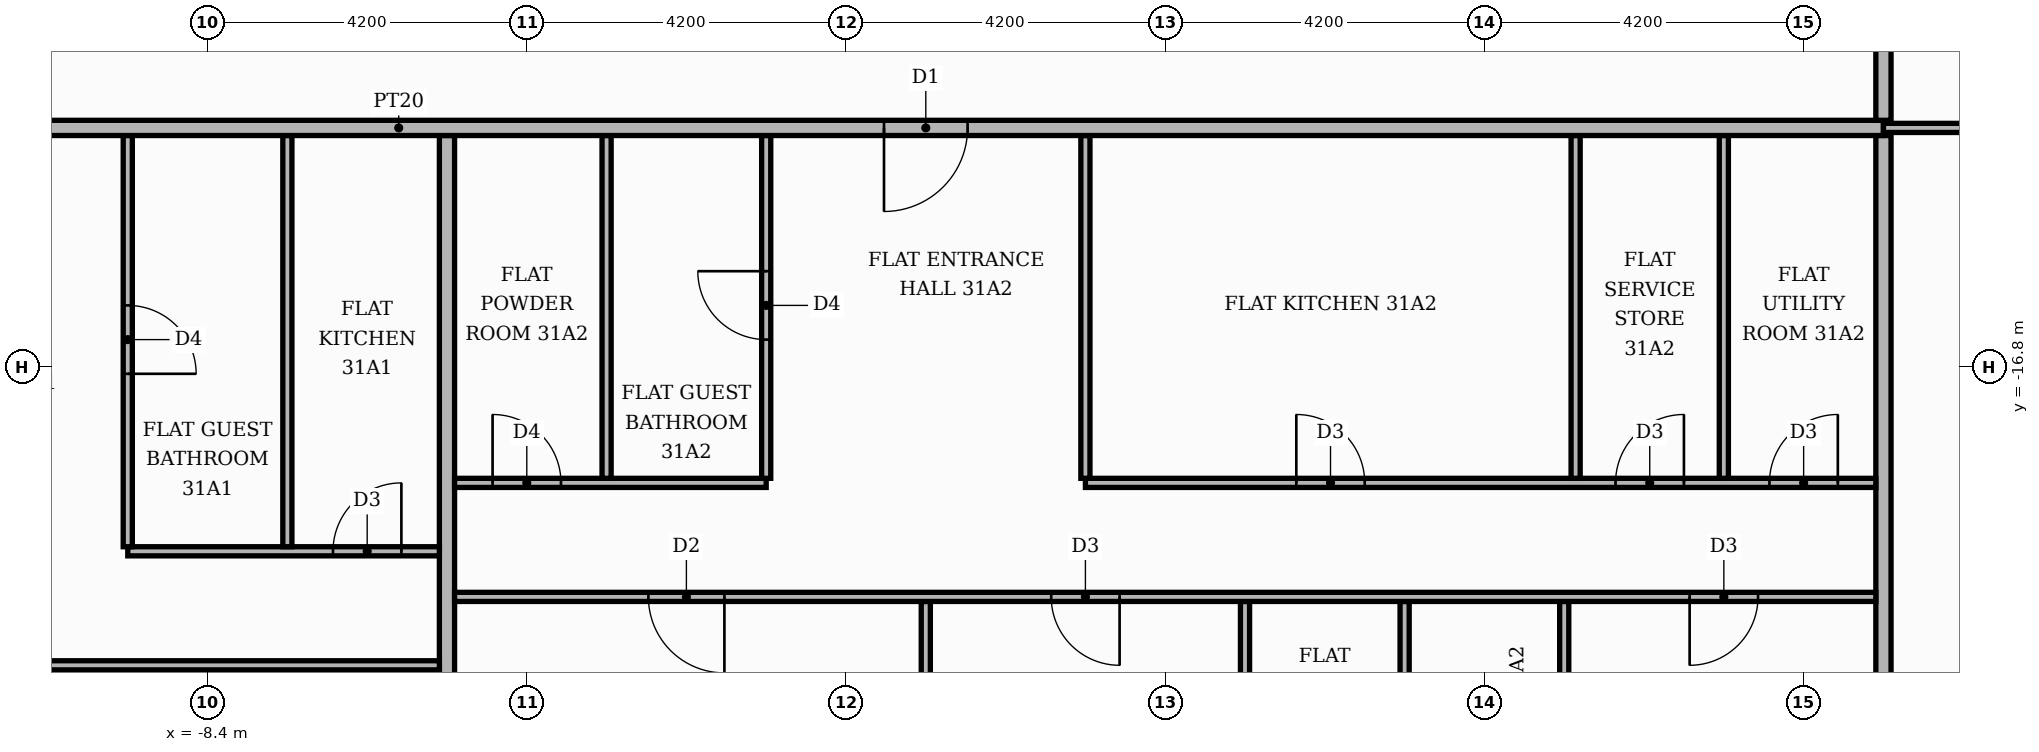
"""IFC4 building model, lengths in metres.
Left out: names, types, materials, properties, quantities, classifications, styles, units other than length and angle.
Written with IfcOpenShell. Run it as: python <this file> out.ifc"""

import sys

from ifc_helpers import new_model, si_unit, direction, frame, frame_2d, origin, place, context, subcontext, project, spatial, rectangle, extrude, element, fill, save


model = new_model("IFC4")
c1 = context("Model", 3, precision=1e-05, world=origin(), true_north=direction((0.0, 1.0)))
c2 = subcontext(c1, "Body", "Model", "MODEL_VIEW")
j1 = project(units=[si_unit("LENGTHUNIT", "METRE"), si_unit("PLANEANGLEUNIT", "RADIAN")], contexts=[c1])
p1 = place(None, origin())
s1 = spatial("IfcSite", under=j1, at=p1, CompositionType="ELEMENT")
p2 = place(p1, origin())
s2 = spatial("IfcBuilding", under=s1, at=p2, CompositionType="ELEMENT")
p3 = place(p2, frame((0.0, 0.0, 133.8)))
s3 = spatial("IfcBuildingStorey", under=s2, at=p3, CompositionType="ELEMENT", Elevation=133.8)
p4 = place(p3, frame((-9.45, -25.42, 0.0), z_axis=(0.0, 0.0, 1.0), x_axis=(0.0, 1.0, 0.0)))
e1 = element("IfcWall", 1, at=p4, inside=s3, PredefinedType="PARTITIONING", context=c2, shape_type="SweptSolid", body=[
    extrude(rectangle(XDim=4.64, YDim=0.12, at=frame_2d((2.32, 0.0))), origin(), (0.0, 0.0, 1.0), 3.48),
])
p5 = place(p4, frame((1.75, 0.0, 0.0)))
e2 = element("IfcOpeningElement", 2, at=p5, cuts=e1, PredefinedType="OPENING", context=c2, shape_type="SweptSolid", body=[
    extrude(rectangle(XDim=0.9, YDim=2.1, at=frame_2d((0.45, 1.05))), frame((0.0, 0.07, 0.0), z_axis=(0.0, -1.0, 0.0), x_axis=(1.0, 0.0, 0.0)), (0.0, 0.0, 1.0), 0.14),
])
p6 = place(p3, frame((-7.35, -25.42, 0.0), z_axis=(0.0, 0.0, 1.0), x_axis=(0.0, 1.0, 0.0)))
e3 = element("IfcWall", 3, at=p6, inside=s3, PredefinedType="PARTITIONING", context=c2, shape_type="SweptSolid", body=[
    extrude(rectangle(XDim=4.64, YDim=0.12, at=frame_2d((2.32, 0.0))), origin(), (0.0, 0.0, 1.0), 3.48),
])
p7 = place(p6, frame((1.75, 0.0, 0.0)))
e4 = element("IfcOpeningElement", 4, at=p7, cuts=e3, PredefinedType="OPENING", context=c2, shape_type="SweptSolid", body=[
    extrude(rectangle(XDim=0.9, YDim=2.1, at=frame_2d((0.45, 1.05))), frame((0.0, 0.07, 0.0), z_axis=(0.0, -1.0, 0.0), x_axis=(1.0, 0.0, 0.0)), (0.0, 0.0, 1.0), 0.14),
])
p8 = place(p3, frame((-5.25, -25.42, 0.0), z_axis=(0.0, 0.0, 1.0), x_axis=(0.0, 1.0, 0.0)))
e5 = element("IfcWall", 5, at=p8, inside=s3, PredefinedType="PARTITIONING", context=c2, shape_type="SweptSolid", body=[
    extrude(rectangle(XDim=11.67, YDim=0.2, at=frame_2d((5.835, 0.0))), origin(), (0.0, 0.0, 1.0), 3.48),
])
p9 = place(p3, frame((1.05, -25.42, 0.0), z_axis=(0.0, 0.0, 1.0), x_axis=(0.0, 1.0, 0.0)))
e6 = element("IfcWall", 6, at=p9, inside=s3, PredefinedType="PARTITIONING", context=c2, shape_type="SweptSolid", body=[
    extrude(rectangle(XDim=5.54, YDim=0.12, at=frame_2d((2.77, 0.0))), origin(), (0.0, 0.0, 1.0), 3.48),
])
p10 = place(p3, frame((5.25, -25.42, 0.0), z_axis=(0.0, 0.0, 1.0), x_axis=(0.0, 1.0, 0.0)))
e7 = element("IfcWall", 7, at=p10, inside=s3, PredefinedType="PARTITIONING", context=c2, shape_type="SweptSolid", body=[
    extrude(rectangle(XDim=5.54, YDim=0.12, at=frame_2d((2.77, 0.0))), origin(), (0.0, 0.0, 1.0), 3.48),
])
p11 = place(p10, frame((2.2, 0.0, 0.0)))
e8 = element("IfcOpeningElement", 8, at=p11, cuts=e7, PredefinedType="OPENING", context=c2, shape_type="SweptSolid", body=[
    extrude(rectangle(XDim=0.9, YDim=2.1, at=frame_2d((0.45, 1.05))), frame((0.0, 0.07, 0.0), z_axis=(0.0, -1.0, 0.0), x_axis=(1.0, 0.0, 0.0)), (0.0, 0.0, 1.0), 0.14),
])
p12 = place(p3, frame((7.35, -25.42, 0.0), z_axis=(0.0, 0.0, 1.0), x_axis=(0.0, 1.0, 0.0)))
e9 = element("IfcWall", 9, at=p12, inside=s3, PredefinedType="PARTITIONING", context=c2, shape_type="SweptSolid", body=[
    extrude(rectangle(XDim=5.54, YDim=0.12, at=frame_2d((2.77, 0.0))), origin(), (0.0, 0.0, 1.0), 3.48),
])
p13 = place(p12, frame((2.2, 0.0, 0.0)))
e10 = element("IfcOpeningElement", 10, at=p13, cuts=e9, PredefinedType="OPENING", context=c2, shape_type="SweptSolid", body=[
    extrude(rectangle(XDim=0.9, YDim=2.1, at=frame_2d((0.45, 1.05))), frame((0.0, 0.07, 0.0), z_axis=(0.0, -1.0, 0.0), x_axis=(1.0, 0.0, 0.0)), (0.0, 0.0, 1.0), 0.14),
])
p14 = place(p3, frame((9.45, -25.42, 0.0), z_axis=(0.0, 0.0, 1.0), x_axis=(0.0, 1.0, 0.0)))
e11 = element("IfcWall", 11, at=p14, inside=s3, PredefinedType="PARTITIONING", context=c2, shape_type="SweptSolid", body=[
    extrude(rectangle(XDim=5.54, YDim=0.12, at=frame_2d((2.77, 0.0))), origin(), (0.0, 0.0, 1.0), 3.48),
])
p15 = place(p3, frame((13.65, -25.42, 0.0), z_axis=(0.0, 0.0, 1.0), x_axis=(0.0, 1.0, 0.0)))
e12 = element("IfcWall", 12, at=p15, inside=s3, PredefinedType="PARTITIONING", context=c2, shape_type="SweptSolid", body=[
    extrude(rectangle(XDim=11.67, YDim=0.2, at=frame_2d((5.835, 0.0))), origin(), (0.0, 0.0, 1.0), 3.48),
])
p16 = place(p3, frame((-25.42, -20.72, 0.0), z_axis=(0.0, 0.0, 1.0), x_axis=(1.0, 0.0, 0.0)))
e13 = element("IfcWall", 13, at=p16, inside=s3, PredefinedType="PARTITIONING", context=c2, shape_type="SweptSolid", body=[
    extrude(rectangle(XDim=20.07, YDim=0.12, at=frame_2d((10.035, 0.0))), origin(), (0.0, 0.0, 1.0), 3.48),
])
p17 = place(p16, frame((10.22, 0.0, 0.0)))
e14 = element("IfcOpeningElement", 14, at=p17, cuts=e13, PredefinedType="OPENING", context=c2, shape_type="SweptSolid", body=[
    extrude(rectangle(XDim=1.0, YDim=2.1, at=frame_2d((0.5, 1.05))), frame((0.0, 0.07, 0.0), z_axis=(0.0, -1.0, 0.0), x_axis=(1.0, 0.0, 0.0)), (0.0, 0.0, 1.0), 0.14),
])
p18 = place(p16, frame((13.42, 0.0, 0.0)))
e15 = element("IfcOpeningElement", 15, at=p18, cuts=e13, PredefinedType="OPENING", context=c2, shape_type="SweptSolid", body=[
    extrude(rectangle(XDim=0.9, YDim=2.1, at=frame_2d((0.45, 1.05))), frame((0.0, 0.07, 0.0), z_axis=(0.0, -1.0, 0.0), x_axis=(1.0, 0.0, 0.0)), (0.0, 0.0, 1.0), 0.14),
])
p19 = place(p3, frame((-5.15, -19.82, 0.0), z_axis=(0.0, 0.0, 1.0), x_axis=(1.0, 0.0, 0.0)))
e16 = element("IfcWall", 16, at=p19, inside=s3, PredefinedType="PARTITIONING", context=c2, shape_type="SweptSolid", body=[
    extrude(rectangle(XDim=18.7, YDim=0.12, at=frame_2d((9.35, 0.0))), origin(), (0.0, 0.0, 1.0), 3.48),
])
p20 = place(p19, frame((2.55, 0.0, 0.0)))
e17 = element("IfcOpeningElement", 17, at=p20, cuts=e16, PredefinedType="OPENING", context=c2, shape_type="SweptSolid", body=[
    extrude(rectangle(XDim=1.0, YDim=2.1, at=frame_2d((0.5, 1.05))), frame((0.0, 0.07, 0.0), z_axis=(0.0, -1.0, 0.0), x_axis=(1.0, 0.0, 0.0)), (0.0, 0.0, 1.0), 0.14),
])
p21 = place(p19, frame((7.85, 0.0, 0.0)))
e18 = element("IfcOpeningElement", 18, at=p21, cuts=e16, PredefinedType="OPENING", context=c2, shape_type="SweptSolid", body=[
    extrude(rectangle(XDim=0.9, YDim=2.1, at=frame_2d((0.45, 1.05))), frame((0.0, 0.07, 0.0), z_axis=(0.0, -1.0, 0.0), x_axis=(1.0, 0.0, 0.0)), (0.0, 0.0, 1.0), 0.14),
])
p22 = place(p19, frame((16.25, 0.0, 0.0)))
e19 = element("IfcOpeningElement", 19, at=p22, cuts=e16, PredefinedType="OPENING", context=c2, shape_type="SweptSolid", body=[
    extrude(rectangle(XDim=0.9, YDim=2.1, at=frame_2d((0.45, 1.05))), frame((0.0, 0.07, 0.0), z_axis=(0.0, -1.0, 0.0), x_axis=(1.0, 0.0, 0.0)), (0.0, 0.0, 1.0), 0.14),
])
p23 = place(p3, frame((-9.45, -19.22, 0.0), z_axis=(0.0, 0.0, 1.0), x_axis=(1.0, 0.0, 0.0)))
e20 = element("IfcWall", 20, at=p23, inside=s3, PredefinedType="PARTITIONING", context=c2, shape_type="SweptSolid", body=[
    extrude(rectangle(XDim=4.1, YDim=0.12, at=frame_2d((2.05, 0.0))), origin(), (0.0, 0.0, 1.0), 3.48),
])
p24 = place(p23, frame((2.7, 0.0, 0.0)))
e21 = element("IfcOpeningElement", 21, at=p24, cuts=e20, PredefinedType="OPENING", context=c2, shape_type="SweptSolid", body=[
    extrude(rectangle(XDim=0.9, YDim=2.1, at=frame_2d((0.45, 1.05))), frame((0.0, 0.07, 0.0), z_axis=(0.0, -1.0, 0.0), x_axis=(1.0, 0.0, 0.0)), (0.0, 0.0, 1.0), 0.14),
])
p25 = place(p3, frame((-9.45, -19.16, 0.0), z_axis=(0.0, 0.0, 1.0), x_axis=(0.0, 1.0, 0.0)))
e22 = element("IfcWall", 22, at=p25, inside=s3, PredefinedType="PARTITIONING", context=c2, shape_type="SweptSolid", body=[
    extrude(rectangle(XDim=5.41, YDim=0.12, at=frame_2d((2.705, 0.0))), origin(), (0.0, 0.0, 1.0), 3.48),
])
p26 = place(p25, frame((2.275, 0.0, 0.0)))
e23 = element("IfcOpeningElement", 23, at=p26, cuts=e22, PredefinedType="OPENING", context=c2, shape_type="SweptSolid", body=[
    extrude(rectangle(XDim=0.9, YDim=2.1, at=frame_2d((0.45, 1.05))), frame((0.0, 0.07, 0.0), z_axis=(0.0, -1.0, 0.0), x_axis=(1.0, 0.0, 0.0)), (0.0, 0.0, 1.0), 0.14),
])
p27 = place(p3, frame((-7.35, -19.16, 0.0), z_axis=(0.0, 0.0, 1.0), x_axis=(0.0, 1.0, 0.0)))
e24 = element("IfcWall", 24, at=p27, inside=s3, PredefinedType="PARTITIONING", context=c2, shape_type="SweptSolid", body=[
    extrude(rectangle(XDim=5.41, YDim=0.12, at=frame_2d((2.705, 0.0))), origin(), (0.0, 0.0, 1.0), 3.48),
])
p28 = place(p3, frame((-5.15, -18.32, 0.0), z_axis=(0.0, 0.0, 1.0), x_axis=(1.0, 0.0, 0.0)))
e25 = element("IfcWall", 25, at=p28, inside=s3, PredefinedType="PARTITIONING", context=c2, shape_type="SweptSolid", body=[
    extrude(rectangle(XDim=4.1, YDim=0.12, at=frame_2d((2.05, 0.0))), origin(), (0.0, 0.0, 1.0), 3.48),
])
p29 = place(p28, frame((0.5, 0.0, 0.0)))
e26 = element("IfcOpeningElement", 26, at=p29, cuts=e25, PredefinedType="OPENING", context=c2, shape_type="SweptSolid", body=[
    extrude(rectangle(XDim=0.9, YDim=2.1, at=frame_2d((0.45, 1.05))), frame((0.0, 0.07, 0.0), z_axis=(0.0, -1.0, 0.0), x_axis=(1.0, 0.0, 0.0)), (0.0, 0.0, 1.0), 0.14),
])
p30 = place(p3, frame((3.15, -18.32, 0.0), z_axis=(0.0, 0.0, 1.0), x_axis=(1.0, 0.0, 0.0)))
e27 = element("IfcWall", 27, at=p30, inside=s3, PredefinedType="PARTITIONING", context=c2, shape_type="SweptSolid", body=[
    extrude(rectangle(XDim=10.4, YDim=0.12, at=frame_2d((5.2, 0.0))), origin(), (0.0, 0.0, 1.0), 3.48),
])
p31 = place(p30, frame((2.775, 0.0, 0.0)))
e28 = element("IfcOpeningElement", 28, at=p31, cuts=e27, PredefinedType="OPENING", context=c2, shape_type="SweptSolid", body=[
    extrude(rectangle(XDim=0.9, YDim=2.1, at=frame_2d((0.45, 1.05))), frame((0.0, 0.07, 0.0), z_axis=(0.0, -1.0, 0.0), x_axis=(1.0, 0.0, 0.0)), (0.0, 0.0, 1.0), 0.14),
])
p32 = place(p30, frame((6.975, 0.0, 0.0)))
e29 = element("IfcOpeningElement", 29, at=p32, cuts=e27, PredefinedType="OPENING", context=c2, shape_type="SweptSolid", body=[
    extrude(rectangle(XDim=0.9, YDim=2.1, at=frame_2d((0.45, 1.05))), frame((0.0, 0.07, 0.0), z_axis=(0.0, -1.0, 0.0), x_axis=(1.0, 0.0, 0.0)), (0.0, 0.0, 1.0), 0.14),
])
p33 = place(p30, frame((9.0, 0.0, 0.0)))
e30 = element("IfcOpeningElement", 30, at=p33, cuts=e27, PredefinedType="OPENING", context=c2, shape_type="SweptSolid", body=[
    extrude(rectangle(XDim=0.9, YDim=2.1, at=frame_2d((0.45, 1.05))), frame((0.0, 0.07, 0.0), z_axis=(0.0, -1.0, 0.0), x_axis=(1.0, 0.0, 0.0)), (0.0, 0.0, 1.0), 0.14),
])
p34 = place(p3, frame((-3.15, -18.26, 0.0), z_axis=(0.0, 0.0, 1.0), x_axis=(0.0, 1.0, 0.0)))
e31 = element("IfcWall", 31, at=p34, inside=s3, PredefinedType="PARTITIONING", context=c2, shape_type="SweptSolid", body=[
    extrude(rectangle(XDim=4.51, YDim=0.12, at=frame_2d((2.255, 0.0))), origin(), (0.0, 0.0, 1.0), 3.48),
])
p35 = place(p3, frame((-1.05, -18.26, 0.0), z_axis=(0.0, 0.0, 1.0), x_axis=(0.0, 1.0, 0.0)))
e32 = element("IfcWall", 32, at=p35, inside=s3, PredefinedType="PARTITIONING", context=c2, shape_type="SweptSolid", body=[
    extrude(rectangle(XDim=4.51, YDim=0.12, at=frame_2d((2.255, 0.0))), origin(), (0.0, 0.0, 1.0), 3.48),
])
p36 = place(p35, frame((1.825, 0.0, 0.0)))
e33 = element("IfcOpeningElement", 33, at=p36, cuts=e32, PredefinedType="OPENING", context=c2, shape_type="SweptSolid", body=[
    extrude(rectangle(XDim=0.9, YDim=2.1, at=frame_2d((0.45, 1.05))), frame((0.0, 0.07, 0.0), z_axis=(0.0, -1.0, 0.0), x_axis=(1.0, 0.0, 0.0)), (0.0, 0.0, 1.0), 0.14),
])
for number, where, z_axis, x_axis in (
    (34, (3.15, -18.26, 0.0), (0.0, 0.0, 1.0), (0.0, 1.0, 0.0)),
    (35, (9.6, -18.26, 0.0), (0.0, 0.0, 1.0), (0.0, 1.0, 0.0)),
    (36, (11.55, -18.26, 0.0), (0.0, 0.0, 1.0), (0.0, 1.0, 0.0)),
):
    element("IfcWall", number, at=place(p3, frame(where, z_axis=z_axis, x_axis=x_axis)), inside=s3, PredefinedType="PARTITIONING", context=c2, shape_type="SweptSolid", body=[
        extrude(rectangle(XDim=4.51, YDim=0.12, at=frame_2d((2.255, 0.0))), origin(), (0.0, 0.0, 1.0), 3.48),
    ])
p37 = place(p3, frame((-25.42, -13.65, 0.0), z_axis=(0.0, 0.0, 1.0), x_axis=(1.0, 0.0, 0.0)))
e37 = element("IfcWall", 37, at=p37, inside=s3, PredefinedType="PARTITIONING", context=c2, shape_type="SweptSolid", body=[
    extrude(rectangle(XDim=39.07, YDim=0.2, at=frame_2d((19.535, 0.0))), origin(), (0.0, 0.0, 1.0), 3.48),
])
p38 = place(p37, frame((13.32, 0.0, 0.0)))
e38 = element("IfcOpeningElement", 38, at=p38, cuts=e37, PredefinedType="OPENING", context=c2, shape_type="SweptSolid", body=[
    extrude(rectangle(XDim=1.1, YDim=2.4, at=frame_2d((0.55, 1.2))), frame((0.0, 0.11, 0.0), z_axis=(0.0, -1.0, 0.0), x_axis=(1.0, 0.0, 0.0)), (0.0, 0.0, 1.0), 0.22),
])
p39 = place(p37, frame((25.92, 0.0, 0.0)))
e39 = element("IfcOpeningElement", 39, at=p39, cuts=e37, PredefinedType="OPENING", context=c2, shape_type="SweptSolid", body=[
    extrude(rectangle(XDim=1.1, YDim=2.4, at=frame_2d((0.55, 1.2))), frame((0.0, 0.11, 0.0), z_axis=(0.0, -1.0, 0.0), x_axis=(1.0, 0.0, 0.0)), (0.0, 0.0, 1.0), 0.22),
])
p40 = place(p3, frame((13.65, -13.65, 0.0), z_axis=(0.0, 0.0, 1.0), x_axis=(1.0, 0.0, 0.0)))
e40 = element("IfcWall", 40, at=p40, inside=s3, PredefinedType="PARTITIONING", context=c2, shape_type="SweptSolid", body=[
    extrude(rectangle(XDim=6.77, YDim=0.12, at=frame_2d((3.385, 0.0))), origin(), (0.0, 0.0, 1.0), 3.48),
])
p41 = place(p40, frame((2.935, 0.0, 0.0)))
e41 = element("IfcOpeningElement", 41, at=p41, cuts=e40, PredefinedType="OPENING", context=c2, shape_type="SweptSolid", body=[
    extrude(rectangle(XDim=0.9, YDim=2.1, at=frame_2d((0.45, 1.05))), frame((0.0, 0.07, 0.0), z_axis=(0.0, -1.0, 0.0), x_axis=(1.0, 0.0, 0.0)), (0.0, 0.0, 1.0), 0.14),
])
p42 = place(p3, frame((13.65, -13.55, 0.0), z_axis=(0.0, 0.0, 1.0), x_axis=(0.0, 1.0, 0.0)))
e42 = element("IfcWall", 42, at=p42, inside=s3, PredefinedType="PARTITIONING", context=c2, shape_type="SweptSolid", body=[
    extrude(rectangle(XDim=2.45, YDim=0.2, at=frame_2d((1.225, 0.0))), origin(), (0.0, 0.0, 1.0), 3.48),
])
p43 = place(p26, frame((0.9, 0.0, 0.0), z_axis=(0.0, 0.0, 1.0), x_axis=(-1.0, 0.0, 0.0)))
e43 = element("IfcDoor", 43, at=p43, inside=s3, OperationType="SINGLE_SWING_LEFT", PredefinedType="DOOR", context=c2, shape_type="SweptSolid", body=[
    extrude(rectangle(XDim=0.9, YDim=2.1, at=frame_2d((0.45, 1.05))), frame((0.0, 0.025, 0.0), z_axis=(0.0, -1.0, 0.0), x_axis=(1.0, 0.0, 0.0)), (0.0, 0.0, 1.0), 0.05),
])
fill(e23, e43)
p44 = place(p24, origin())
e44 = element("IfcDoor", 44, at=p44, inside=s3, OperationType="SINGLE_SWING_RIGHT", PredefinedType="DOOR", context=c2, shape_type="SweptSolid", body=[
    extrude(rectangle(XDim=0.9, YDim=2.1, at=frame_2d((0.45, 1.05))), frame((0.0, 0.025, 0.0), z_axis=(0.0, -1.0, 0.0), x_axis=(1.0, 0.0, 0.0)), (0.0, 0.0, 1.0), 0.05),
])
fill(e21, e44)
p45 = place(p39, frame((1.1, 0.0, 0.0), z_axis=(0.0, 0.0, 1.0), x_axis=(-1.0, 0.0, 0.0)))
e45 = element("IfcDoor", 45, at=p45, inside=s3, OperationType="SINGLE_SWING_LEFT", PredefinedType="DOOR", context=c2, shape_type="SweptSolid", body=[
    extrude(rectangle(XDim=1.1, YDim=2.4, at=frame_2d((0.55, 1.2))), frame((0.0, 0.025, 0.0), z_axis=(0.0, -1.0, 0.0), x_axis=(1.0, 0.0, 0.0)), (0.0, 0.0, 1.0), 0.05),
])
fill(e39, e45)
p46 = place(p29, origin())
e46 = element("IfcDoor", 46, at=p46, inside=s3, OperationType="SINGLE_SWING_LEFT", PredefinedType="DOOR", context=c2, shape_type="SweptSolid", body=[
    extrude(rectangle(XDim=0.9, YDim=2.1, at=frame_2d((0.45, 1.05))), frame((0.0, 0.025, 0.0), z_axis=(0.0, -1.0, 0.0), x_axis=(1.0, 0.0, 0.0)), (0.0, 0.0, 1.0), 0.05),
])
fill(e26, e46)
p47 = place(p36, origin())
e47 = element("IfcDoor", 47, at=p47, inside=s3, OperationType="SINGLE_SWING_RIGHT", PredefinedType="DOOR", context=c2, shape_type="SweptSolid", body=[
    extrude(rectangle(XDim=0.9, YDim=2.1, at=frame_2d((0.45, 1.05))), frame((0.0, 0.025, 0.0), z_axis=(0.0, -1.0, 0.0), x_axis=(1.0, 0.0, 0.0)), (0.0, 0.0, 1.0), 0.05),
])
fill(e33, e47)
p48 = place(p31, origin())
e48 = element("IfcDoor", 48, at=p48, inside=s3, OperationType="SINGLE_SWING_LEFT", PredefinedType="DOOR", context=c2, shape_type="SweptSolid", body=[
    extrude(rectangle(XDim=0.9, YDim=2.1, at=frame_2d((0.45, 1.05))), frame((0.0, 0.025, 0.0), z_axis=(0.0, -1.0, 0.0), x_axis=(1.0, 0.0, 0.0)), (0.0, 0.0, 1.0), 0.05),
])
fill(e28, e48)
p49 = place(p32, origin())
e49 = element("IfcDoor", 49, at=p49, inside=s3, OperationType="SINGLE_SWING_RIGHT", PredefinedType="DOOR", context=c2, shape_type="SweptSolid", body=[
    extrude(rectangle(XDim=0.9, YDim=2.1, at=frame_2d((0.45, 1.05))), frame((0.0, 0.025, 0.0), z_axis=(0.0, -1.0, 0.0), x_axis=(1.0, 0.0, 0.0)), (0.0, 0.0, 1.0), 0.05),
])
fill(e29, e49)
p50 = place(p33, origin())
e50 = element("IfcDoor", 50, at=p50, inside=s3, OperationType="SINGLE_SWING_RIGHT", PredefinedType="DOOR", context=c2, shape_type="SweptSolid", body=[
    extrude(rectangle(XDim=0.9, YDim=2.1, at=frame_2d((0.45, 1.05))), frame((0.0, 0.025, 0.0), z_axis=(0.0, -1.0, 0.0), x_axis=(1.0, 0.0, 0.0)), (0.0, 0.0, 1.0), 0.05),
])
fill(e30, e50)
p51 = place(p20, frame((1.0, 0.0, 0.0), z_axis=(0.0, 0.0, 1.0), x_axis=(-1.0, 0.0, 0.0)))
e51 = element("IfcDoor", 51, at=p51, inside=s3, OperationType="SINGLE_SWING_RIGHT", PredefinedType="DOOR", context=c2, shape_type="SweptSolid", body=[
    extrude(rectangle(XDim=1.0, YDim=2.1, at=frame_2d((0.5, 1.05))), frame((0.0, 0.025, 0.0), z_axis=(0.0, -1.0, 0.0), x_axis=(1.0, 0.0, 0.0)), (0.0, 0.0, 1.0), 0.05),
])
fill(e17, e51)
p52 = place(p21, frame((0.9, 0.0, 0.0), z_axis=(0.0, 0.0, 1.0), x_axis=(-1.0, 0.0, 0.0)))
e52 = element("IfcDoor", 52, at=p52, inside=s3, OperationType="SINGLE_SWING_RIGHT", PredefinedType="DOOR", context=c2, shape_type="SweptSolid", body=[
    extrude(rectangle(XDim=0.9, YDim=2.1, at=frame_2d((0.45, 1.05))), frame((0.0, 0.025, 0.0), z_axis=(0.0, -1.0, 0.0), x_axis=(1.0, 0.0, 0.0)), (0.0, 0.0, 1.0), 0.05),
])
fill(e18, e52)
p53 = place(p22, frame((0.9, 0.0, 0.0), z_axis=(0.0, 0.0, 1.0), x_axis=(-1.0, 0.0, 0.0)))
e53 = element("IfcDoor", 53, at=p53, inside=s3, OperationType="SINGLE_SWING_LEFT", PredefinedType="DOOR", context=c2, shape_type="SweptSolid", body=[
    extrude(rectangle(XDim=0.9, YDim=2.1, at=frame_2d((0.45, 1.05))), frame((0.0, 0.025, 0.0), z_axis=(0.0, -1.0, 0.0), x_axis=(1.0, 0.0, 0.0)), (0.0, 0.0, 1.0), 0.05),
])
fill(e19, e53)
save(model, sys.argv[1])
